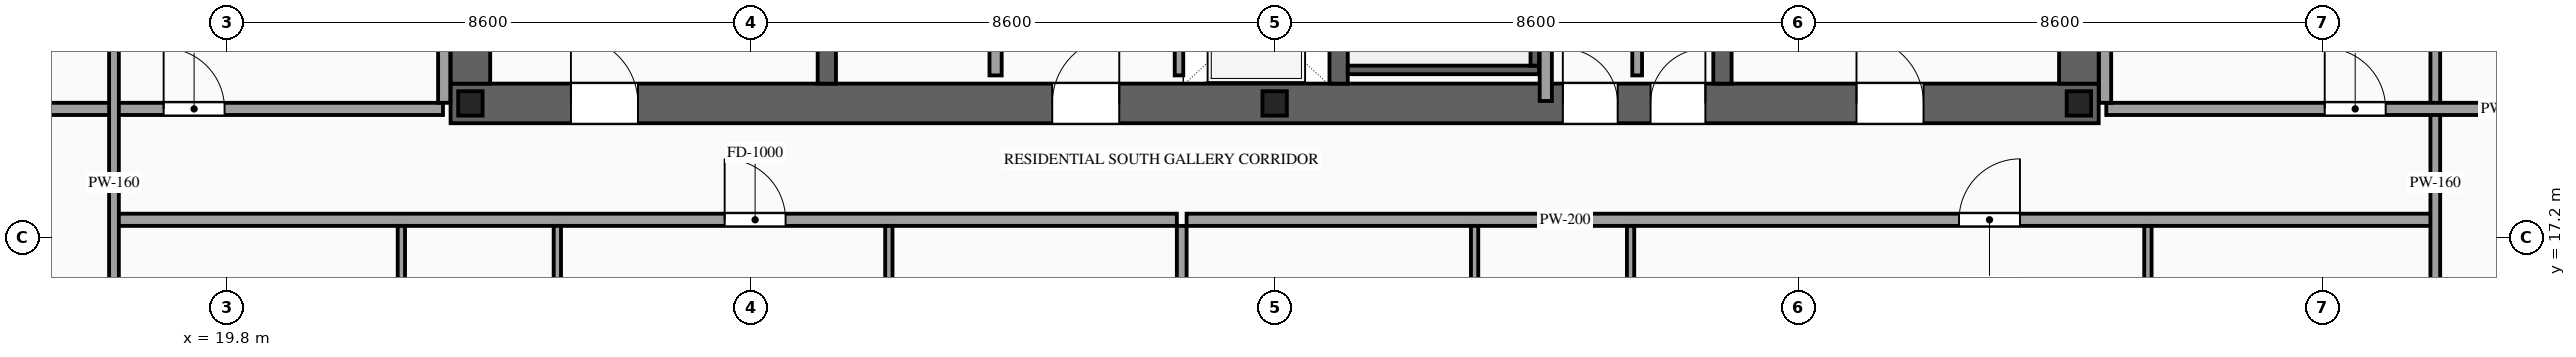
"""IFC4 building model, lengths in metres.
Left out: names, types, materials, properties, quantities, classifications, styles, units other than length and angle.
Written with IfcOpenShell. Run it as: python <this file> out.ifc"""

import sys

from ifc_helpers import new_model, si_unit, direction, frame, frame_2d, origin, origin_2d, place, context, subcontext, project, spatial, rectangle, i_section, extrude, source, transform, mapped, element, fill, save


model = new_model("IFC4")
c1 = context("Model", 3, precision=1e-05, world=origin(), true_north=direction((0.0, 1.0)))
c2 = subcontext(c1, "Body", "Model", "MODEL_VIEW")
j1 = project(units=[si_unit("LENGTHUNIT", "METRE"), si_unit("PLANEANGLEUNIT", "RADIAN")], contexts=[c1])
p1 = place(None, origin())
s1 = spatial("IfcSite", under=j1, at=p1, CompositionType="ELEMENT")
p2 = place(p1, origin())
s2 = spatial("IfcBuilding", under=s1, at=p2, CompositionType="ELEMENT")
p3 = place(p2, frame((0.0, 0.0, 216.0)))
s3 = spatial("IfcBuildingStorey", under=s2, at=p3, CompositionType="ELEMENT", Elevation=216.0)
p4 = place(p3, frame((23.475, 19.4, 0.0), z_axis=(0.0, 0.0, 1.0), x_axis=(1.0, 0.0, 0.0)))
e1 = element("IfcWall", 1, at=p4, inside=s3, PredefinedType="SHEAR", context=c2, shape_type="SweptSolid", body=[
    extrude(rectangle(XDim=27.05, YDim=0.65, at=frame_2d((13.525, 0.0))), origin(), (0.0, 0.0, 1.0), 3.5),
])
p5 = place(p4, frame((1.975, 0.0, 0.0)))
e2 = element("IfcOpeningElement", 2, at=p5, cuts=e1, PredefinedType="OPENING", context=c2, shape_type="SweptSolid", body=[
    extrude(rectangle(XDim=1.1, YDim=2.2, at=frame_2d((0.55, 1.1))), frame((0.0, 0.34, 0.0), z_axis=(0.0, -1.0, 0.0), x_axis=(1.0, 0.0, 0.0)), (0.0, 0.0, 1.0), 0.68),
])
p6 = place(p4, frame((9.875, 0.0, 0.0)))
e3 = element("IfcOpeningElement", 3, at=p6, cuts=e1, PredefinedType="OPENING", context=c2, shape_type="SweptSolid", body=[
    extrude(rectangle(XDim=1.1, YDim=2.2, at=frame_2d((0.55, 1.1))), frame((0.0, 0.34, 0.0), z_axis=(0.0, -1.0, 0.0), x_axis=(1.0, 0.0, 0.0)), (0.0, 0.0, 1.0), 0.68),
])
p7 = place(p4, frame((23.075, 0.0, 0.0)))
e4 = element("IfcOpeningElement", 4, at=p7, cuts=e1, PredefinedType="OPENING", context=c2, shape_type="SweptSolid", body=[
    extrude(rectangle(XDim=1.1, YDim=2.2, at=frame_2d((0.55, 1.1))), frame((0.0, 0.34, 0.0), z_axis=(0.0, -1.0, 0.0), x_axis=(1.0, 0.0, 0.0)), (0.0, 0.0, 1.0), 0.68),
])
p8 = place(p4, frame((19.695, 0.0, 0.0)))
e5 = element("IfcOpeningElement", 5, at=p8, cuts=e1, PredefinedType="OPENING", context=c2, shape_type="SweptSolid", body=[
    extrude(rectangle(XDim=0.9, YDim=2.15, at=frame_2d((0.45, 1.075))), frame((0.0, 0.34, 0.0), z_axis=(0.0, -1.0, 0.0), x_axis=(1.0, 0.0, 0.0)), (0.0, 0.0, 1.0), 0.68),
])
p9 = place(p4, frame((18.255, 0.0, 0.0)))
e6 = element("IfcOpeningElement", 6, at=p9, cuts=e1, PredefinedType="OPENING", context=c2, shape_type="SweptSolid", body=[
    extrude(rectangle(XDim=0.9, YDim=2.15, at=frame_2d((0.45, 1.075))), frame((0.0, 0.34, 0.0), z_axis=(0.0, -1.0, 0.0), x_axis=(1.0, 0.0, 0.0)), (0.0, 0.0, 1.0), 0.68),
])
m1 = source(origin(), c2, "Body", "SweptSolid", [
    extrude(rectangle(XDim=12.15, YDim=0.65, at=frame_2d((6.075, 0.0))), origin(), (0.0, 0.0, 1.0), 3.5),
])
for number, where, z_axis, x_axis in (
    (7, (23.8, 19.725, 0.0), (0.0, 0.0, 1.0), (0.0, 1.0, 0.0)),
    (8, (50.2, 19.725, 0.0), (0.0, 0.0, 1.0), (0.0, 1.0, 0.0)),
):
    element("IfcWall", number, at=place(p3, frame(where, z_axis=z_axis, x_axis=x_axis)), inside=s3, PredefinedType="SHEAR", context=c2, shape_type="MappedRepresentation", body=[
        mapped(m1, transform((0.0, 0.0, 0.0), scale=1.0)),
    ])
m2 = source(origin(), c2, "Body", "SweptSolid", [
    extrude(rectangle(XDim=12.15, YDim=0.3, at=frame_2d((6.075, 0.0))), origin(), (0.0, 0.0, 1.0), 3.5),
])
for number, where, z_axis, x_axis in (
    (9, (29.65, 19.725, 0.0), (0.0, 0.0, 1.0), (0.0, 1.0, 0.0)),
    (10, (38.05, 19.725, 0.0), (0.0, 0.0, 1.0), (0.0, 1.0, 0.0)),
    (11, (44.35, 19.725, 0.0), (0.0, 0.0, 1.0), (0.0, 1.0, 0.0)),
):
    element("IfcWall", number, at=place(p3, frame(where, z_axis=z_axis, x_axis=x_axis)), inside=s3, PredefinedType="SOLIDWALL", context=c2, shape_type="MappedRepresentation", body=[
        mapped(m2, transform((0.0, 0.0, 0.0), scale=1.0)),
    ])
m3 = source(origin(), c2, "Body", "SweptSolid", [
    extrude(i_section(OverallWidth=0.4, OverallDepth=0.4, WebThickness=0.013, FlangeThickness=0.021, at=origin_2d()), origin(), (0.0, 0.0, 1.0), 3.5),
])
for number, where, z_axis, x_axis in (
    (12, (23.8, 19.4, 0.0), (0.0, 0.0, 1.0), (1.0, 0.0, 0.0)),
    (13, (37.0, 19.4, 0.0), (0.0, 0.0, 1.0), (1.0, 0.0, 0.0)),
    (14, (50.2, 19.4, 0.0), (0.0, 0.0, 1.0), (1.0, 0.0, 0.0)),
):
    element("IfcColumn", number, at=place(p3, frame(where, z_axis=z_axis, x_axis=x_axis)), inside=s3, PredefinedType="COLUMN", context=c2, shape_type="MappedRepresentation", body=[
        mapped(m3, transform((0.0, 0.0, 0.0), scale=1.0)),
    ])
p10 = place(p3, frame((35.43, 19.86, 0.0), z_axis=(0.0, 0.0, 1.0), x_axis=(0.0, 1.0, 0.0)))
e15 = element("IfcWall", 15, at=p10, inside=s3, PredefinedType="SOLIDWALL", context=c2, shape_type="SweptSolid", body=[
    extrude(rectangle(XDim=2.04, YDim=0.14, at=frame_2d((1.02, 0.0))), origin(), (0.0, 0.0, 1.0), 3.22),
])
p11 = place(p10, frame((0.47, 0.0, 0.0)))
e16 = element("IfcOpeningElement", 16, at=p11, cuts=e15, PredefinedType="OPENING", context=c2, shape_type="SweptSolid", body=[
    extrude(rectangle(XDim=1.1, YDim=2.2, at=frame_2d((0.55, 1.1))), frame((0.0, 0.085, 0.0), z_axis=(0.0, -1.0, 0.0), x_axis=(1.0, 0.0, 0.0)), (0.0, 0.0, 1.0), 0.17),
])
m4 = source(origin(), c2, "Body", "SweptSolid", [
    extrude(rectangle(XDim=3.14, YDim=0.14, at=frame_2d((1.57, 0.0))), origin(), (0.0, 0.0, 1.0), 3.22),
])
p12 = place(p3, frame((38.2, 19.95, 0.0), z_axis=(0.0, 0.0, 1.0), x_axis=(1.0, 0.0, 0.0)))
e17 = element("IfcWall", 17, at=p12, inside=s3, PredefinedType="SOLIDWALL", context=c2, shape_type="MappedRepresentation", body=[
    mapped(m4, transform((0.0, 0.0, 0.0), scale=1.0)),
])
m5 = source(origin(), c2, "Body", "SweptSolid", [
    extrude(rectangle(XDim=8.94, YDim=0.14, at=frame_2d((4.47, 0.0))), origin(), (0.0, 0.0, 1.0), 3.22),
])
p13 = place(p3, frame((41.27, 20.02, 0.0), z_axis=(0.0, 0.0, 1.0), x_axis=(0.0, 1.0, 0.0)))
e18 = element("IfcWall", 18, at=p13, inside=s3, PredefinedType="SOLIDWALL", context=c2, shape_type="MappedRepresentation", body=[
    mapped(m5, transform((0.0, 0.0, 0.0), scale=1.0)),
])
p14 = place(p3, frame((32.42, 19.86, 0.0), z_axis=(0.0, 0.0, 1.0), x_axis=(0.0, 1.0, 0.0)))
e19 = element("IfcWall", 19, at=p14, inside=s3, PredefinedType="PARTITIONING", context=c2, shape_type="SweptSolid", body=[
    extrude(rectangle(XDim=3.94, YDim=0.2, at=frame_2d((1.97, 0.0))), origin(), (0.0, 0.0, 1.0), 3.22),
])
p15 = place(p14, frame((1.52, 0.0, 0.0)))
e20 = element("IfcOpeningElement", 20, at=p15, cuts=e19, PredefinedType="OPENING", context=c2, shape_type="SweptSolid", body=[
    extrude(rectangle(XDim=0.9, YDim=2.15, at=frame_2d((0.45, 1.075))), frame((0.0, 0.115, 0.0), z_axis=(0.0, -1.0, 0.0), x_axis=(1.0, 0.0, 0.0)), (0.0, 0.0, 1.0), 0.23),
])
m6 = source(origin(), c2, "Body", "SweptSolid", [
    extrude(rectangle(XDim=1.34, YDim=0.16, at=frame_2d((0.67, 0.0))), origin(), (0.0, 0.0, 1.0), 3.22),
])
p16 = place(p3, frame((42.95, 19.86, 0.0), z_axis=(0.0, 0.0, 1.0), x_axis=(0.0, 1.0, 0.0)))
e21 = element("IfcWall", 21, at=p16, inside=s3, PredefinedType="PARTITIONING", context=c2, shape_type="MappedRepresentation", body=[
    mapped(m6, transform((0.0, 0.0, 0.0), scale=1.0)),
])
m7 = source(origin(), c2, "Body", "SweptSolid", [
    extrude(rectangle(XDim=6.51, YDim=0.2, at=frame_2d((3.255, 0.0))), origin(), (0.0, 0.0, 1.0), 3.22),
])
p17 = place(p3, frame((41.45, 19.44, 0.0), z_axis=(0.0, 0.0, 1.0), x_axis=(0.0, 1.0, 0.0)))
e22 = element("IfcWall", 22, at=p17, inside=s3, PredefinedType="PARTITIONING", context=c2, shape_type="MappedRepresentation", body=[
    mapped(m7, transform((0.0, 0.0, 0.0), scale=1.0)),
])
p18 = place(p3, frame((17.94, 17.49, 0.0), z_axis=(0.0, 0.0, 1.0), x_axis=(1.0, 0.0, 0.0)))
e23 = element("IfcWall", 23, at=p18, inside=s3, PredefinedType="PARTITIONING", context=c2, shape_type="SweptSolid", body=[
    extrude(rectangle(XDim=17.455, YDim=0.2, at=frame_2d((8.728, 0.0))), origin(), (0.0, 0.0, 1.0), 3.22),
])
p19 = place(p18, frame((10.033, 0.0, 0.0)))
e24 = element("IfcOpeningElement", 24, at=p19, cuts=e23, PredefinedType="OPENING", context=c2, shape_type="SweptSolid", body=[
    extrude(rectangle(XDim=1.0, YDim=2.2, at=frame_2d((0.5, 1.1))), frame((0.0, 0.115, 0.0), z_axis=(0.0, -1.0, 0.0), x_axis=(1.0, 0.0, 0.0)), (0.0, 0.0, 1.0), 0.23),
])
m8 = source(origin(), c2, "Body", "SweptSolid", [
    extrude(rectangle(XDim=13.54, YDim=0.16, at=frame_2d((6.77, 0.0))), origin(), (0.0, 0.0, 1.0), 3.22),
])
p20 = place(p3, frame((35.475, 3.85, 0.0), z_axis=(0.0, 0.0, 1.0), x_axis=(0.0, 1.0, 0.0)))
e25 = element("IfcWall", 25, at=p20, inside=s3, PredefinedType="PARTITIONING", context=c2, shape_type="MappedRepresentation", body=[
    mapped(m8, transform((0.0, 0.0, 0.0), scale=1.0)),
])
m9 = source(origin(), c2, "Body", "SweptSolid", [
    extrude(rectangle(XDim=5.61, YDim=0.12, at=frame_2d((2.805, 0.0))), origin(), (0.0, 0.0, 1.0), 1.615),
])
p21 = place(p3, frame((22.667, 11.78, 0.0), z_axis=(0.0, 0.0, 1.0), x_axis=(0.0, 1.0, 0.0)))
e26 = element("IfcWall", 26, at=p21, inside=s3, PredefinedType="PARTITIONING", context=c2, shape_type="MappedRepresentation", body=[
    mapped(m9, transform((0.0, 0.0, 0.0), scale=1.0)),
])
p22 = place(p3, frame((25.227, 11.78, 0.0), z_axis=(0.0, 0.0, 1.0), x_axis=(0.0, 1.0, 0.0)))
e27 = element("IfcWall", 27, at=p22, inside=s3, PredefinedType="PARTITIONING", context=c2, shape_type="SweptSolid", body=[
    extrude(rectangle(XDim=5.61, YDim=0.12, at=frame_2d((2.805, 0.0))), origin(), (0.0, 0.0, 1.0), 3.22),
])
p23 = place(p22, frame((2.38, 0.0, 0.0)))
e28 = element("IfcOpeningElement", 28, at=p23, cuts=e27, PredefinedType="OPENING", context=c2, shape_type="SweptSolid", body=[
    extrude(rectangle(XDim=0.85, YDim=2.1, at=frame_2d((0.425, 1.05))), frame((0.0, 0.075, 0.0), z_axis=(0.0, -1.0, 0.0), x_axis=(1.0, 0.0, 0.0)), (0.0, 0.0, 1.0), 0.15),
])
m10 = source(origin(), c2, "Body", "SweptSolid", [
    extrude(rectangle(XDim=5.61, YDim=0.12, at=frame_2d((2.805, 0.0))), origin(), (0.0, 0.0, 1.0), 3.22),
])
p24 = place(p3, frame((30.668, 11.78, 0.0), z_axis=(0.0, 0.0, 1.0), x_axis=(0.0, 1.0, 0.0)))
e29 = element("IfcWall", 29, at=p24, inside=s3, PredefinedType="PARTITIONING", context=c2, shape_type="MappedRepresentation", body=[
    mapped(m10, transform((0.0, 0.0, 0.0), scale=1.0)),
])
p25 = place(p3, frame((35.555, 17.49, 0.0), z_axis=(0.0, 0.0, 1.0), x_axis=(1.0, 0.0, 0.0)))
e30 = element("IfcWall", 30, at=p25, inside=s3, PredefinedType="PARTITIONING", context=c2, shape_type="SweptSolid", body=[
    extrude(rectangle(XDim=20.505, YDim=0.2, at=frame_2d((10.252, 0.0))), origin(), (0.0, 0.0, 1.0), 3.22),
])
p26 = place(p25, frame((12.678, 0.0, 0.0)))
e31 = element("IfcOpeningElement", 31, at=p26, cuts=e30, PredefinedType="OPENING", context=c2, shape_type="SweptSolid", body=[
    extrude(rectangle(XDim=1.0, YDim=2.2, at=frame_2d((0.5, 1.1))), frame((0.0, 0.115, 0.0), z_axis=(0.0, -1.0, 0.0), x_axis=(1.0, 0.0, 0.0)), (0.0, 0.0, 1.0), 0.23),
])
p27 = place(p3, frame((40.282, 11.78, 0.0), z_axis=(0.0, 0.0, 1.0), x_axis=(0.0, 1.0, 0.0)))
e32 = element("IfcWall", 32, at=p27, inside=s3, PredefinedType="PARTITIONING", context=c2, shape_type="MappedRepresentation", body=[
    mapped(m10, transform((0.0, 0.0, 0.0), scale=1.0)),
])
p28 = place(p3, frame((42.842, 11.78, 0.0), z_axis=(0.0, 0.0, 1.0), x_axis=(0.0, 1.0, 0.0)))
e33 = element("IfcWall", 33, at=p28, inside=s3, PredefinedType="PARTITIONING", context=c2, shape_type="SweptSolid", body=[
    extrude(rectangle(XDim=5.61, YDim=0.12, at=frame_2d((2.805, 0.0))), origin(), (0.0, 0.0, 1.0), 3.22),
])
p29 = place(p28, frame((2.38, 0.0, 0.0)))
e34 = element("IfcOpeningElement", 34, at=p29, cuts=e33, PredefinedType="OPENING", context=c2, shape_type="SweptSolid", body=[
    extrude(rectangle(XDim=0.85, YDim=2.1, at=frame_2d((0.425, 1.05))), frame((0.0, 0.075, 0.0), z_axis=(0.0, -1.0, 0.0), x_axis=(1.0, 0.0, 0.0)), (0.0, 0.0, 1.0), 0.15),
])
p30 = place(p3, frame((51.333, 11.78, 0.0), z_axis=(0.0, 0.0, 1.0), x_axis=(0.0, 1.0, 0.0)))
e35 = element("IfcWall", 35, at=p30, inside=s3, PredefinedType="PARTITIONING", context=c2, shape_type="MappedRepresentation", body=[
    mapped(m9, transform((0.0, 0.0, 0.0), scale=1.0)),
])
p31 = place(p3, frame((15.05, 19.31, 0.0), z_axis=(0.0, 0.0, 1.0), x_axis=(1.0, 0.0, 0.0)))
e36 = element("IfcWall", 36, at=p31, inside=s3, PredefinedType="PARTITIONING", context=c2, shape_type="SweptSolid", body=[
    extrude(rectangle(XDim=8.3, YDim=0.2, at=frame_2d((4.15, 0.0))), origin(), (0.0, 0.0, 1.0), 3.22),
])
p32 = place(p31, frame((3.715, 0.0, 0.0)))
e37 = element("IfcOpeningElement", 37, at=p32, cuts=e36, PredefinedType="OPENING", context=c2, shape_type="SweptSolid", body=[
    extrude(rectangle(XDim=1.0, YDim=2.2, at=frame_2d((0.5, 1.1))), frame((0.0, 0.115, 0.0), z_axis=(0.0, -1.0, 0.0), x_axis=(1.0, 0.0, 0.0)), (0.0, 0.0, 1.0), 0.23),
])
m11 = source(origin(), c2, "Body", "SweptSolid", [
    extrude(rectangle(XDim=6.29, YDim=0.2, at=frame_2d((3.145, 0.0))), origin(), (0.0, 0.0, 1.0), 3.22),
])
p33 = place(p3, frame((23.37, 19.41, 0.0), z_axis=(0.0, 0.0, 1.0), x_axis=(0.0, 1.0, 0.0)))
e38 = element("IfcWall", 38, at=p33, inside=s3, PredefinedType="PARTITIONING", context=c2, shape_type="MappedRepresentation", body=[
    mapped(m11, transform((0.0, 0.0, 0.0), scale=1.0)),
])
m12 = source(origin(), c2, "Body", "SweptSolid", [
    extrude(rectangle(XDim=28.19, YDim=0.16, at=frame_2d((14.095, 0.0))), origin(), (0.0, 0.0, 1.0), 3.22),
])
for number, where, z_axis, x_axis in (
    (39, (17.95, 4.0, 0.0), (0.0, 0.0, 1.0), (0.0, 1.0, 0.0)),
    (40, (56.05, 4.0, 0.0), (0.0, 0.0, 1.0), (0.0, 1.0, 0.0)),
):
    element("IfcWall", number, at=place(p3, frame(where, z_axis=z_axis, x_axis=x_axis)), inside=s3, PredefinedType="PARTITIONING", context=c2, shape_type="MappedRepresentation", body=[
        mapped(m12, transform((0.0, 0.0, 0.0), scale=1.0)),
    ])
p34 = place(p3, frame((50.65, 19.31, 0.0), z_axis=(0.0, 0.0, 1.0), x_axis=(1.0, 0.0, 0.0)))
e41 = element("IfcWall", 41, at=p34, inside=s3, PredefinedType="PARTITIONING", context=c2, shape_type="SweptSolid", body=[
    extrude(rectangle(XDim=8.3, YDim=0.2, at=frame_2d((4.15, 0.0))), origin(), (0.0, 0.0, 1.0), 3.22),
])
p35 = place(p34, frame((3.585, 0.0, 0.0)))
e42 = element("IfcOpeningElement", 42, at=p35, cuts=e41, PredefinedType="OPENING", context=c2, shape_type="SweptSolid", body=[
    extrude(rectangle(XDim=1.0, YDim=2.2, at=frame_2d((0.5, 1.1))), frame((0.0, 0.115, 0.0), z_axis=(0.0, -1.0, 0.0), x_axis=(1.0, 0.0, 0.0)), (0.0, 0.0, 1.0), 0.23),
])
p36 = place(p3, frame((50.63, 19.41, 0.0), z_axis=(0.0, 0.0, 1.0), x_axis=(0.0, 1.0, 0.0)))
e43 = element("IfcWall", 43, at=p36, inside=s3, PredefinedType="PARTITIONING", context=c2, shape_type="MappedRepresentation", body=[
    mapped(m11, transform((0.0, 0.0, 0.0), scale=1.0)),
])
m13 = source(origin(), c2, "Body", "SweptSolid", [
    extrude(rectangle(XDim=1.1, YDim=2.2, at=frame_2d((0.55, 1.1))), frame((0.0, 0.025, 0.0), z_axis=(0.0, -1.0, 0.0), x_axis=(1.0, 0.0, 0.0)), (0.0, 0.0, 1.0), 0.05),
])
p37 = place(p5, origin())
e44 = element("IfcDoor", 44, at=p37, inside=s3, OperationType="SINGLE_SWING_LEFT", PredefinedType="DOOR", context=c2, shape_type="MappedRepresentation", body=[
    mapped(m13, transform((0.0, 0.0, 0.0), scale=1.0)),
])
fill(e2, e44)
p38 = place(p6, origin())
e45 = element("IfcDoor", 45, at=p38, inside=s3, OperationType="SINGLE_SWING_RIGHT", PredefinedType="DOOR", context=c2, shape_type="MappedRepresentation", body=[
    mapped(m13, transform((0.0, 0.0, 0.0), scale=1.0)),
])
fill(e3, e45)
p39 = place(p7, origin())
e46 = element("IfcDoor", 46, at=p39, inside=s3, OperationType="SINGLE_SWING_LEFT", PredefinedType="DOOR", context=c2, shape_type="MappedRepresentation", body=[
    mapped(m13, transform((0.0, 0.0, 0.0), scale=1.0)),
])
fill(e4, e46)
m14 = source(origin(), c2, "Body", "SweptSolid", [
    extrude(rectangle(XDim=0.9, YDim=2.15, at=frame_2d((0.45, 1.075))), frame((0.0, 0.025, 0.0), z_axis=(0.0, -1.0, 0.0), x_axis=(1.0, 0.0, 0.0)), (0.0, 0.0, 1.0), 0.05),
])
p40 = place(p8, origin())
e47 = element("IfcDoor", 47, at=p40, inside=s3, OperationType="SINGLE_SWING_RIGHT", PredefinedType="DOOR", context=c2, shape_type="MappedRepresentation", body=[
    mapped(m14, transform((0.0, 0.0, 0.0), scale=1.0)),
])
fill(e5, e47)
p41 = place(p9, origin())
e48 = element("IfcDoor", 48, at=p41, inside=s3, OperationType="SINGLE_SWING_LEFT", PredefinedType="DOOR", context=c2, shape_type="MappedRepresentation", body=[
    mapped(m14, transform((0.0, 0.0, 0.0), scale=1.0)),
])
fill(e6, e48)
m15 = source(origin(), c2, "Body", "SweptSolid", [
    extrude(rectangle(XDim=1.0, YDim=2.2, at=frame_2d((0.5, 1.1))), frame((0.0, 0.025, 0.0), z_axis=(0.0, -1.0, 0.0), x_axis=(1.0, 0.0, 0.0)), (0.0, 0.0, 1.0), 0.05),
])
p42 = place(p19, origin())
e49 = element("IfcDoor", 49, at=p42, inside=s3, OperationType="SINGLE_SWING_LEFT", PredefinedType="DOOR", context=c2, shape_type="MappedRepresentation", body=[
    mapped(m15, transform((0.0, 0.0, 0.0), scale=1.0)),
])
fill(e24, e49)
p43 = place(p26, origin())
e50 = element("IfcDoor", 50, at=p43, inside=s3, OperationType="SINGLE_SWING_RIGHT", PredefinedType="DOOR", context=c2, shape_type="MappedRepresentation", body=[
    mapped(m15, transform((0.0, 0.0, 0.0), scale=1.0)),
])
fill(e31, e50)
p44 = place(p32, origin())
e51 = element("IfcDoor", 51, at=p44, inside=s3, OperationType="SINGLE_SWING_LEFT", PredefinedType="DOOR", context=c2, shape_type="MappedRepresentation", body=[
    mapped(m15, transform((0.0, 0.0, 0.0), scale=1.0)),
])
fill(e37, e51)
p45 = place(p35, origin())
e52 = element("IfcDoor", 52, at=p45, inside=s3, OperationType="SINGLE_SWING_LEFT", PredefinedType="DOOR", context=c2, shape_type="MappedRepresentation", body=[
    mapped(m15, transform((0.0, 0.0, 0.0), scale=1.0)),
])
fill(e42, e52)
save(model, sys.argv[1])
